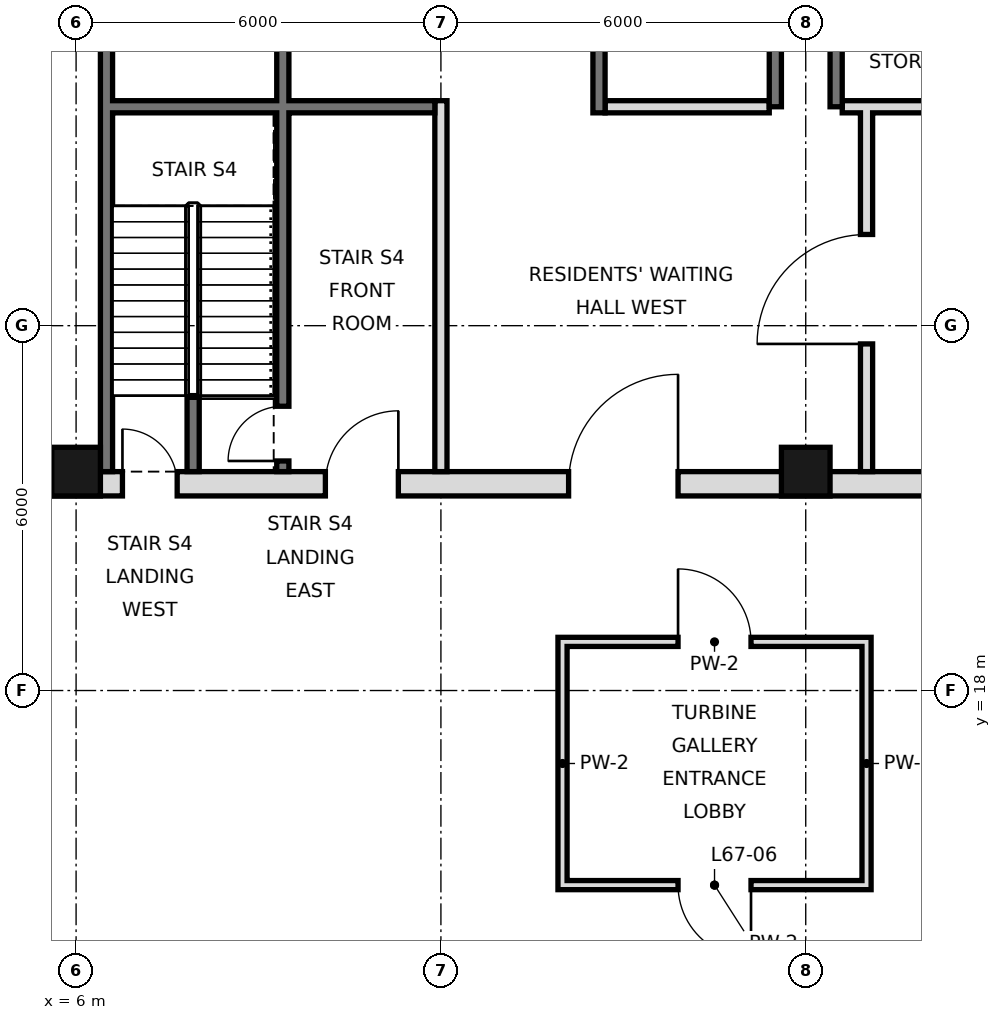
"""IFC4 building model, lengths in metres.
Left out: names, types, materials, properties, quantities, classifications, styles, units other than length and angle.
Written with IfcOpenShell. Run it as: python <this file> out.ifc"""

import sys

from ifc_helpers import new_model, si_unit, direction, frame, frame_2d, origin, origin_2d, place, context, subcontext, project, spatial, rectangle, hollow_rectangle, extrude, element, fill, save


model = new_model("IFC4")
c1 = context("Model", 3, precision=1e-05, world=origin(), true_north=direction((0.0, 1.0)))
c2 = subcontext(c1, "Body", "Model", "MODEL_VIEW")
j1 = project(units=[si_unit("LENGTHUNIT", "METRE"), si_unit("PLANEANGLEUNIT", "RADIAN")], contexts=[c1])
p1 = place(None, origin())
s1 = spatial("IfcSite", under=j1, at=p1, CompositionType="ELEMENT")
p2 = place(p1, origin())
s2 = spatial("IfcBuilding", under=s1, at=p2, CompositionType="ELEMENT")
p3 = place(p2, frame((0.0, 0.0, 281.8)))
s3 = spatial("IfcBuildingStorey", under=s2, at=p3, CompositionType="ELEMENT", Elevation=281.8)
for number, where, z_axis, x_axis in (
    (1, (6.0, 21.6, 0.0), (0.0, 0.0, 1.0), (1.0, 0.0, 0.0)),
    (2, (18.0, 21.6, 0.0), (0.0, 0.0, 1.0), (1.0, 0.0, 0.0)),
):
    element("IfcColumn", number, at=place(p3, frame(where, z_axis=z_axis, x_axis=x_axis)), inside=s3, PredefinedType="COLUMN", context=c2, shape_type="SweptSolid", body=[
        extrude(hollow_rectangle(XDim=0.8, YDim=0.8, WallThickness=0.032, at=origin_2d()), origin(), (0.0, 0.0, 1.0), 9.0),
    ])
for number, where, z_axis, x_axis in (
    (3, (14.0, 14.725, 0.0), (0.0, 0.0, 1.0), (0.0, 1.0, 0.0)),
    (4, (19.0, 14.725, 0.0), (0.0, 0.0, 1.0), (0.0, 1.0, 0.0)),
):
    element("IfcWall", number, at=place(p3, frame(where, z_axis=z_axis, x_axis=x_axis)), inside=s3, PredefinedType="PARTITIONING", context=c2, shape_type="SweptSolid", body=[
        extrude(rectangle(XDim=4.15, YDim=0.15, at=frame_2d((2.075, 0.0))), origin(), (0.0, 0.0, 1.0), 8.7),
    ])
p4 = place(p3, frame((14.075, 14.8, 0.0), z_axis=(0.0, 0.0, 1.0), x_axis=(1.0, 0.0, 0.0)))
e5 = element("IfcWall", 5, at=p4, inside=s3, PredefinedType="PARTITIONING", context=c2, shape_type="SweptSolid", body=[
    extrude(rectangle(XDim=4.85, YDim=0.15, at=frame_2d((2.425, 0.0))), origin(), (0.0, 0.0, 1.0), 8.7),
])
p5 = place(p4, frame((1.825, 0.0, 0.0)))
e6 = element("IfcOpeningElement", 6, at=p5, cuts=e5, PredefinedType="OPENING", context=c2, shape_type="SweptSolid", body=[
    extrude(rectangle(XDim=1.2, YDim=2.4, at=frame_2d((0.6, 1.2))), frame((0.0, 0.085, 0.0), z_axis=(0.0, -1.0, 0.0), x_axis=(1.0, 0.0, 0.0)), (0.0, 0.0, 1.0), 0.17),
])
p6 = place(p3, frame((14.075, 18.8, 0.0), z_axis=(0.0, 0.0, 1.0), x_axis=(1.0, 0.0, 0.0)))
e7 = element("IfcWall", 7, at=p6, inside=s3, PredefinedType="PARTITIONING", context=c2, shape_type="SweptSolid", body=[
    extrude(rectangle(XDim=4.85, YDim=0.15, at=frame_2d((2.425, 0.0))), origin(), (0.0, 0.0, 1.0), 8.7),
])
p7 = place(p6, frame((1.825, 0.0, 0.0)))
e8 = element("IfcOpeningElement", 8, at=p7, cuts=e7, PredefinedType="OPENING", context=c2, shape_type="SweptSolid", body=[
    extrude(rectangle(XDim=1.2, YDim=2.4, at=frame_2d((0.6, 1.2))), frame((0.0, 0.085, 0.0), z_axis=(0.0, -1.0, 0.0), x_axis=(1.0, 0.0, 0.0)), (0.0, 0.0, 1.0), 0.17),
])
p8 = place(p3, frame((6.5, 21.6, 0.0), z_axis=(0.0, 0.0, 1.0), x_axis=(0.0, 1.0, 0.0)))
e9 = element("IfcWall", 9, at=p8, inside=s3, PredefinedType="SOLIDWALL", context=c2, shape_type="SweptSolid", body=[
    extrude(rectangle(XDim=23.5, YDim=0.2, at=frame_2d((11.75, 0.0))), origin(), (0.0, 0.0, 1.0), 8.7),
])
for number, where, z_axis, x_axis in (
    (10, (17.5, 27.6, 0.0), (0.0, 0.0, 1.0), (0.0, 1.0, 0.0)),
    (11, (18.5, 27.6, 0.0), (0.0, 0.0, 1.0), (0.0, 1.0, 0.0)),
):
    element("IfcWall", number, at=place(p3, frame(where, z_axis=z_axis, x_axis=x_axis)), inside=s3, PredefinedType="SOLIDWALL", context=c2, shape_type="SweptSolid", body=[
        extrude(rectangle(XDim=17.5, YDim=0.2, at=frame_2d((8.75, 0.0))), origin(), (0.0, 0.0, 1.0), 8.7),
    ])
p9 = place(p3, frame((5.6, 21.4, 0.0), z_axis=(0.0, 0.0, 1.0), x_axis=(1.0, 0.0, 0.0)))
e12 = element("IfcWall", 12, at=p9, inside=s3, PredefinedType="SOLIDWALL", context=c2, shape_type="SweptSolid", body=[
    extrude(rectangle(XDim=36.8, YDim=0.4, at=frame_2d((18.4, 0.0))), origin(), (0.0, 0.0, 1.0), 8.7),
])
p10 = place(p9, frame((8.5, 0.0, 0.0)))
e13 = element("IfcOpeningElement", 13, at=p10, cuts=e12, PredefinedType="OPENING", context=c2, shape_type="SweptSolid", body=[
    extrude(rectangle(XDim=1.8, YDim=2.1, at=frame_2d((0.9, 1.05))), frame((0.0, 0.21, 0.0), z_axis=(0.0, -1.0, 0.0), x_axis=(1.0, 0.0, 0.0)), (0.0, 0.0, 1.0), 0.42),
])
p11 = place(p9, frame((17.5, 0.0, 0.0)))
e14 = element("IfcOpeningElement", 14, at=p11, cuts=e12, PredefinedType="OPENING", context=c2, shape_type="SweptSolid", body=[
    extrude(rectangle(XDim=1.8, YDim=2.1, at=frame_2d((0.9, 1.05))), frame((0.0, 0.21, 0.0), z_axis=(0.0, -1.0, 0.0), x_axis=(1.0, 0.0, 0.0)), (0.0, 0.0, 1.0), 0.42),
])
p12 = place(p9, frame((26.5, 0.0, 0.0)))
e15 = element("IfcOpeningElement", 15, at=p12, cuts=e12, PredefinedType="OPENING", context=c2, shape_type="SweptSolid", body=[
    extrude(rectangle(XDim=1.8, YDim=2.1, at=frame_2d((0.9, 1.05))), frame((0.0, 0.21, 0.0), z_axis=(0.0, -1.0, 0.0), x_axis=(1.0, 0.0, 0.0)), (0.0, 0.0, 1.0), 0.42),
])
p13 = place(p9, frame((4.5, 0.0, 0.0)))
e16 = element("IfcOpeningElement", 16, at=p13, cuts=e12, PredefinedType="OPENING", context=c2, shape_type="SweptSolid", body=[
    extrude(rectangle(XDim=1.2, YDim=2.1, at=frame_2d((0.6, 1.05))), frame((0.0, 0.21, 0.0), z_axis=(0.0, -1.0, 0.0), x_axis=(1.0, 0.0, 0.0)), (0.0, 0.0, 1.0), 0.42),
])
p14 = place(p9, frame((31.1, 0.0, 0.0)))
e17 = element("IfcOpeningElement", 17, at=p14, cuts=e12, PredefinedType="OPENING", context=c2, shape_type="SweptSolid", body=[
    extrude(rectangle(XDim=1.2, YDim=2.1, at=frame_2d((0.6, 1.05))), frame((0.0, 0.21, 0.0), z_axis=(0.0, -1.0, 0.0), x_axis=(1.0, 0.0, 0.0)), (0.0, 0.0, 1.0), 0.42),
])
p15 = place(p9, frame((1.163, 0.0, 0.0)))
e18 = element("IfcOpeningElement", 18, at=p15, cuts=e12, PredefinedType="OPENING", context=c2, shape_type="SweptSolid", body=[
    extrude(rectangle(XDim=0.9, YDim=2.1, at=frame_2d((0.45, 1.05))), frame((0.0, 0.21, 0.0), z_axis=(0.0, -1.0, 0.0), x_axis=(1.0, 0.0, 0.0)), (0.0, 0.0, 1.0), 0.42),
])
p16 = place(p9, frame((34.738, 0.0, 0.0)))
e19 = element("IfcOpeningElement", 19, at=p16, cuts=e12, PredefinedType="OPENING", context=c2, shape_type="SweptSolid", body=[
    extrude(rectangle(XDim=0.9, YDim=2.1, at=frame_2d((0.45, 1.05))), frame((0.0, 0.21, 0.0), z_axis=(0.0, -1.0, 0.0), x_axis=(1.0, 0.0, 0.0)), (0.0, 0.0, 1.0), 0.42),
])
p17 = place(p3, frame((19.0, 21.6, 0.0), z_axis=(0.0, 0.0, 1.0), x_axis=(0.0, 1.0, 0.0)))
e20 = element("IfcWall", 20, at=p17, inside=s3, PredefinedType="PARTITIONING", context=c2, shape_type="SweptSolid", body=[
    extrude(rectangle(XDim=6.0, YDim=0.2, at=frame_2d((3.0, 0.0))), origin(), (0.0, 0.0, 1.0), 8.7),
])
p18 = place(p17, frame((2.1, 0.0, 0.0)))
e21 = element("IfcOpeningElement", 21, at=p18, cuts=e20, PredefinedType="OPENING", context=c2, shape_type="SweptSolid", body=[
    extrude(rectangle(XDim=1.8, YDim=2.1, at=frame_2d((0.9, 1.05))), frame((0.0, 0.11, 0.0), z_axis=(0.0, -1.0, 0.0), x_axis=(1.0, 0.0, 0.0)), (0.0, 0.0, 1.0), 0.22),
])
p19 = place(p3, frame((12.0, 21.6, 0.0), z_axis=(0.0, 0.0, 1.0), x_axis=(0.0, 1.0, 0.0)))
e22 = element("IfcWall", 22, at=p19, inside=s3, PredefinedType="PARTITIONING", context=c2, shape_type="SweptSolid", body=[
    extrude(rectangle(XDim=6.1, YDim=0.2, at=frame_2d((3.05, 0.0))), origin(), (0.0, 0.0, 1.0), 8.7),
])
p20 = place(p3, frame((14.6, 27.5, 0.0), z_axis=(0.0, 0.0, 1.0), x_axis=(0.0, 1.0, 0.0)))
e23 = element("IfcWall", 23, at=p20, inside=s3, PredefinedType="SOLIDWALL", context=c2, shape_type="SweptSolid", body=[
    extrude(rectangle(XDim=17.5, YDim=0.2, at=frame_2d((8.75, 0.0))), origin(), (0.0, 0.0, 1.0), 8.7),
])
p21 = place(p20, frame((15.4, 0.0, 0.0)))
e24 = element("IfcOpeningElement", 24, at=p21, cuts=e23, PredefinedType="OPENING", context=c2, shape_type="SweptSolid", body=[
    extrude(rectangle(XDim=1.1, YDim=2.1, at=frame_2d((0.55, 1.05))), frame((0.0, 0.11, 0.0), z_axis=(0.0, -1.0, 0.0), x_axis=(1.0, 0.0, 0.0)), (0.0, 0.0, 1.0), 0.22),
])
p22 = place(p20, frame((2.7, 0.0, 0.0)))
e25 = element("IfcOpeningElement", 25, at=p22, cuts=e23, PredefinedType="OPENING", context=c2, shape_type="SweptSolid", body=[
    extrude(rectangle(XDim=1.0, YDim=2.1, at=frame_2d((0.5, 1.05))), frame((0.0, 0.11, 0.0), z_axis=(0.0, -1.0, 0.0), x_axis=(1.0, 0.0, 0.0)), (0.0, 0.0, 1.0), 0.22),
])
p23 = place(p20, frame((9.9, 0.0, 0.0)))
e26 = element("IfcOpeningElement", 26, at=p23, cuts=e23, PredefinedType="OPENING", context=c2, shape_type="SweptSolid", body=[
    extrude(rectangle(XDim=0.9, YDim=2.1, at=frame_2d((0.45, 1.05))), frame((0.0, 0.11, 0.0), z_axis=(0.0, -1.0, 0.0), x_axis=(1.0, 0.0, 0.0)), (0.0, 0.0, 1.0), 0.22),
])
p24 = place(p3, frame((7.925, 21.6, 0.0), z_axis=(0.0, 0.0, 1.0), x_axis=(0.0, 1.0, 0.0)))
e27 = element("IfcWall", 27, at=p24, inside=s3, PredefinedType="SOLIDWALL", context=c2, shape_type="SweptSolid", body=[
    extrude(rectangle(XDim=1.25, YDim=0.2, at=frame_2d((0.625, 0.0))), origin(), (0.0, 0.0, 1.0), 8.7),
])
p25 = place(p3, frame((9.4, 21.6, 0.0), z_axis=(0.0, 0.0, 1.0), x_axis=(0.0, 1.0, 0.0)))
e28 = element("IfcWall", 28, at=p25, inside=s3, PredefinedType="SOLIDWALL", context=c2, shape_type="SweptSolid", body=[
    extrude(rectangle(XDim=23.4, YDim=0.2, at=frame_2d((11.7, 0.0))), origin(), (0.0, 0.0, 1.0), 8.7),
])
p26 = place(p25, frame((7.95, 0.0, 0.0)))
e29 = element("IfcOpeningElement", 29, at=p26, cuts=e28, PredefinedType="OPENING", context=c2, shape_type="SweptSolid", body=[
    extrude(rectangle(XDim=1.0, YDim=2.1, at=frame_2d((0.5, 1.05))), frame((0.0, 0.11, 0.0), z_axis=(0.0, -1.0, 0.0), x_axis=(1.0, 0.0, 0.0)), (0.0, 0.0, 1.0), 0.22),
])
p27 = place(p25, frame((12.6, 0.0, 0.0)))
e30 = element("IfcOpeningElement", 30, at=p27, cuts=e28, PredefinedType="OPENING", context=c2, shape_type="SweptSolid", body=[
    extrude(rectangle(XDim=1.0, YDim=2.1, at=frame_2d((0.5, 1.05))), frame((0.0, 0.11, 0.0), z_axis=(0.0, -1.0, 0.0), x_axis=(1.0, 0.0, 0.0)), (0.0, 0.0, 1.0), 0.22),
])
p28 = place(p25, frame((15.7, 0.0, 0.0)))
e31 = element("IfcOpeningElement", 31, at=p28, cuts=e28, PredefinedType="OPENING", context=c2, shape_type="SweptSolid", body=[
    extrude(rectangle(XDim=1.0, YDim=2.1, at=frame_2d((0.5, 1.05))), frame((0.0, 0.11, 0.0), z_axis=(0.0, -1.0, 0.0), x_axis=(1.0, 0.0, 0.0)), (0.0, 0.0, 1.0), 0.22),
])
p29 = place(p25, frame((22.1, 0.0, 0.0)))
e32 = element("IfcOpeningElement", 32, at=p29, cuts=e28, PredefinedType="OPENING", context=c2, shape_type="SweptSolid", body=[
    extrude(rectangle(XDim=1.0, YDim=2.1, at=frame_2d((0.5, 1.05))), frame((0.0, 0.11, 0.0), z_axis=(0.0, -1.0, 0.0), x_axis=(1.0, 0.0, 0.0)), (0.0, 0.0, 1.0), 0.22),
])
p30 = place(p25, frame((0.175, 0.0, 0.0)))
e33 = element("IfcOpeningElement", 33, at=p30, cuts=e28, PredefinedType="OPENING", context=c2, shape_type="SweptSolid", body=[
    extrude(rectangle(XDim=0.9, YDim=2.1, at=frame_2d((0.45, 1.05))), frame((0.0, 0.11, 0.0), z_axis=(0.0, -1.0, 0.0), x_axis=(1.0, 0.0, 0.0)), (0.0, 0.0, 1.0), 0.22),
])
for number, where, z_axis, x_axis in (
    (34, (14.7, 27.6, 0.0), (0.0, 0.0, 1.0), (1.0, 0.0, 0.0)),
    (35, (18.6, 27.6, 0.0), (0.0, 0.0, 1.0), (1.0, 0.0, 0.0)),
):
    element("IfcWall", number, at=place(p3, frame(where, z_axis=z_axis, x_axis=x_axis)), inside=s3, PredefinedType="PARTITIONING", context=c2, shape_type="SweptSolid", body=[
        extrude(rectangle(XDim=2.7, YDim=0.2, at=frame_2d((1.35, 0.0))), origin(), (0.0, 0.0, 1.0), 8.7),
    ])
p31 = place(p3, frame((6.6, 27.6, 0.0), z_axis=(0.0, 0.0, 1.0), x_axis=(1.0, 0.0, 0.0)))
e36 = element("IfcWall", 36, at=p31, inside=s3, PredefinedType="SOLIDWALL", context=c2, shape_type="SweptSolid", body=[
    extrude(rectangle(XDim=5.3, YDim=0.2, at=frame_2d((2.65, 0.0))), origin(), (0.0, 0.0, 1.0), 8.7),
])
p32 = place(p7, origin())
e37 = element("IfcDoor", 37, at=p32, inside=s3, OperationType="SINGLE_SWING_LEFT", PredefinedType="DOOR", context=c2, shape_type="SweptSolid", body=[
    extrude(rectangle(XDim=1.2, YDim=2.4, at=frame_2d((0.6, 1.2))), frame((0.0, 0.025, 0.0), z_axis=(0.0, -1.0, 0.0), x_axis=(1.0, 0.0, 0.0)), (0.0, 0.0, 1.0), 0.05),
])
fill(e8, e37)
p33 = place(p5, origin())
e38 = element("IfcDoor", 38, at=p33, inside=s3, OperationType="SINGLE_SWING_RIGHT", PredefinedType="DOOR", context=c2, shape_type="SweptSolid", body=[
    extrude(rectangle(XDim=1.2, YDim=2.4, at=frame_2d((0.6, 1.2))), frame((0.0, 0.025, 0.0), z_axis=(0.0, -1.0, 0.0), x_axis=(1.0, 0.0, 0.0)), (0.0, 0.0, 1.0), 0.05),
])
fill(e6, e38)
p34 = place(p10, frame((1.8, 0.0, 0.0), z_axis=(0.0, 0.0, 1.0), x_axis=(-1.0, 0.0, 0.0)))
e39 = element("IfcDoor", 39, at=p34, inside=s3, OperationType="SINGLE_SWING_LEFT", PredefinedType="DOOR", context=c2, shape_type="SweptSolid", body=[
    extrude(rectangle(XDim=1.8, YDim=2.1, at=frame_2d((0.9, 1.05))), frame((0.0, 0.025, 0.0), z_axis=(0.0, -1.0, 0.0), x_axis=(1.0, 0.0, 0.0)), (0.0, 0.0, 1.0), 0.05),
])
fill(e13, e39)
p35 = place(p18, origin())
e40 = element("IfcDoor", 40, at=p35, inside=s3, OperationType="SINGLE_SWING_LEFT", PredefinedType="DOOR", context=c2, shape_type="SweptSolid", body=[
    extrude(rectangle(XDim=1.8, YDim=2.1, at=frame_2d((0.9, 1.05))), frame((0.0, 0.025, 0.0), z_axis=(0.0, -1.0, 0.0), x_axis=(1.0, 0.0, 0.0)), (0.0, 0.0, 1.0), 0.05),
])
fill(e21, e40)
p36 = place(p13, frame((1.2, 0.0, 0.0), z_axis=(0.0, 0.0, 1.0), x_axis=(-1.0, 0.0, 0.0)))
e41 = element("IfcDoor", 41, at=p36, inside=s3, OperationType="SINGLE_SWING_LEFT", PredefinedType="DOOR", context=c2, shape_type="SweptSolid", body=[
    extrude(rectangle(XDim=1.2, YDim=2.1, at=frame_2d((0.6, 1.05))), frame((0.0, 0.025, 0.0), z_axis=(0.0, -1.0, 0.0), x_axis=(1.0, 0.0, 0.0)), (0.0, 0.0, 1.0), 0.05),
])
fill(e16, e41)
p37 = place(p15, origin())
e42 = element("IfcDoor", 42, at=p37, inside=s3, OperationType="SINGLE_SWING_LEFT", PredefinedType="DOOR", context=c2, shape_type="SweptSolid", body=[
    extrude(rectangle(XDim=0.9, YDim=2.1, at=frame_2d((0.45, 1.05))), frame((0.0, 0.025, 0.0), z_axis=(0.0, -1.0, 0.0), x_axis=(1.0, 0.0, 0.0)), (0.0, 0.0, 1.0), 0.05),
])
fill(e18, e42)
p38 = place(p30, origin())
e43 = element("IfcDoor", 43, at=p38, inside=s3, OperationType="SINGLE_SWING_LEFT", PredefinedType="DOOR", context=c2, shape_type="SweptSolid", body=[
    extrude(rectangle(XDim=0.9, YDim=2.1, at=frame_2d((0.45, 1.05))), frame((0.0, 0.025, 0.0), z_axis=(0.0, -1.0, 0.0), x_axis=(1.0, 0.0, 0.0)), (0.0, 0.0, 1.0), 0.05),
])
fill(e33, e43)
save(model, sys.argv[1])
